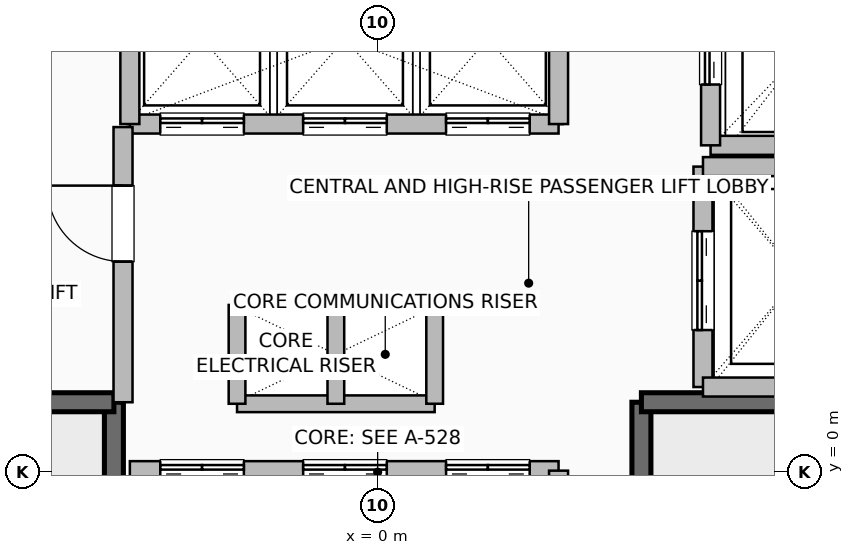
"""IFC4 building model, lengths in metres.
Left out: names, types, materials, properties, quantities, classifications, styles, units other than length and angle.
Written with IfcOpenShell. Run it as: python <this file> out.ifc"""

import sys

from ifc_helpers import new_model, si_unit, direction, frame, frame_2d, origin, place, context, subcontext, project, spatial, rectangle, extrude, element, fill, save


model = new_model("IFC4")
c1 = context("Model", 3, precision=1e-05, world=origin(), true_north=direction((0.0, 1.0)))
c2 = subcontext(c1, "Body", "Model", "MODEL_VIEW")
j1 = project(units=[si_unit("LENGTHUNIT", "METRE"), si_unit("PLANEANGLEUNIT", "RADIAN")], contexts=[c1])
p1 = place(None, origin())
s1 = spatial("IfcSite", under=j1, at=p1, CompositionType="ELEMENT")
p2 = place(p1, origin())
s2 = spatial("IfcBuilding", under=s1, at=p2, CompositionType="ELEMENT")
p3 = place(p2, frame((0.0, 0.0, 108.4)))
s3 = spatial("IfcBuildingStorey", under=s2, at=p3, CompositionType="ELEMENT", Elevation=108.4)
p4 = place(p3, frame((-3.47, -6.8, 0.0), z_axis=(0.0, 0.0, 1.0), x_axis=(0.0, 1.0, 0.0)))
e1 = element("IfcWall", 1, at=p4, inside=s3, PredefinedType="SHEAR", context=c2, shape_type="SweptSolid", body=[
    extrude(rectangle(XDim=7.72, YDim=0.25, at=frame_2d((3.86, 0.0))), origin(), (0.0, 0.0, 1.0), 3.36),
])
p5 = place(p3, frame((-6.8, 0.92, 0.0), z_axis=(0.0, 0.0, 1.0), x_axis=(1.0, 0.0, 0.0)))
e2 = element("IfcWall", 2, at=p5, inside=s3, PredefinedType="SHEAR", context=c2, shape_type="SweptSolid", body=[
    extrude(rectangle(XDim=3.33, YDim=0.25, at=frame_2d((1.665, 0.0))), origin(), (0.0, 0.0, 1.0), 3.36),
])
p6 = place(p3, frame((3.47, -6.8, 0.0), z_axis=(0.0, 0.0, 1.0), x_axis=(0.0, 1.0, 0.0)))
e3 = element("IfcWall", 3, at=p6, inside=s3, PredefinedType="SHEAR", context=c2, shape_type="SweptSolid", body=[
    extrude(rectangle(XDim=7.72, YDim=0.25, at=frame_2d((3.86, 0.0))), origin(), (0.0, 0.0, 1.0), 3.36),
])
p7 = place(p3, frame((3.47, 0.92, 0.0), z_axis=(0.0, 0.0, 1.0), x_axis=(1.0, 0.0, 0.0)))
e4 = element("IfcWall", 4, at=p7, inside=s3, PredefinedType="SHEAR", context=c2, shape_type="SweptSolid", body=[
    extrude(rectangle(XDim=3.33, YDim=0.25, at=frame_2d((1.665, 0.0))), origin(), (0.0, 0.0, 1.0), 3.36),
])
for number, where, z_axis, x_axis in (
    (5, (-1.85, 2.2, 0.0), (0.0, 0.0, 1.0), (1.0, 0.0, 0.0)),
    (6, (-1.85, 0.9, 0.0), (0.0, 0.0, 1.0), (1.0, 0.0, 0.0)),
):
    element("IfcWall", number, at=place(p3, frame(where, z_axis=z_axis, x_axis=x_axis)), inside=s3, PredefinedType="PARTITIONING", context=c2, shape_type="SweptSolid", body=[
        extrude(rectangle(XDim=2.6, YDim=0.22, at=frame_2d((1.3, 0.0))), origin(), (0.0, 0.0, 1.0), 3.36),
    ])
for number, where, z_axis, x_axis in (
    (7, (-0.55, 0.9, 0.0), (0.0, 0.0, 1.0), (0.0, 1.0, 0.0)),
    (8, (0.75, 0.9, 0.0), (0.0, 0.0, 1.0), (0.0, 1.0, 0.0)),
    (9, (-1.85, 0.9, 0.0), (0.0, 0.0, 1.0), (0.0, 1.0, 0.0)),
):
    element("IfcWall", number, at=place(p3, frame(where, z_axis=z_axis, x_axis=x_axis)), inside=s3, PredefinedType="PARTITIONING", context=c2, shape_type="SweptSolid", body=[
        extrude(rectangle(XDim=1.3, YDim=0.22, at=frame_2d((0.65, 0.0))), origin(), (0.0, 0.0, 1.0), 3.36),
    ])
p8 = place(p3, frame((-3.26, 0.02, 0.0), z_axis=(0.0, 0.0, 1.0), x_axis=(1.0, 0.0, 0.0)))
e10 = element("IfcWall", 10, at=p8, inside=s3, PredefinedType="SHEAR", context=c2, shape_type="SweptSolid", body=[
    extrude(rectangle(XDim=5.64, YDim=0.25, at=frame_2d((2.82, 0.0))), origin(), (0.0, 0.0, 1.0), 3.36),
])
p9 = place(p8, frame((0.4, 0.0, 0.0)))
e11 = element("IfcOpeningElement", 11, at=p9, cuts=e10, PredefinedType="OPENING", context=c2, shape_type="SweptSolid", body=[
    extrude(rectangle(XDim=1.1, YDim=2.2, at=frame_2d((0.55, 1.1))), frame((0.0, 0.135, 0.0), z_axis=(0.0, -1.0, 0.0), x_axis=(1.0, 0.0, 0.0)), (0.0, 0.0, 1.0), 0.27),
])
p10 = place(p8, frame((2.28, 0.0, 0.0)))
e12 = element("IfcOpeningElement", 12, at=p10, cuts=e10, PredefinedType="OPENING", context=c2, shape_type="SweptSolid", body=[
    extrude(rectangle(XDim=1.1, YDim=2.2, at=frame_2d((0.55, 1.1))), frame((0.0, 0.135, 0.0), z_axis=(0.0, -1.0, 0.0), x_axis=(1.0, 0.0, 0.0)), (0.0, 0.0, 1.0), 0.27),
])
p11 = place(p8, frame((4.16, 0.0, 0.0)))
e13 = element("IfcOpeningElement", 13, at=p11, cuts=e10, PredefinedType="OPENING", context=c2, shape_type="SweptSolid", body=[
    extrude(rectangle(XDim=1.1, YDim=2.2, at=frame_2d((0.55, 1.1))), frame((0.0, 0.135, 0.0), z_axis=(0.0, -1.0, 0.0), x_axis=(1.0, 0.0, 0.0)), (0.0, 0.0, 1.0), 0.27),
])
p12 = place(p3, frame((2.38, -2.42, 0.0), z_axis=(0.0, 0.0, 1.0), x_axis=(0.0, 1.0, 0.0)))
e14 = element("IfcWall", 14, at=p12, inside=s3, PredefinedType="SHEAR", context=c2, shape_type="SweptSolid", body=[
    extrude(rectangle(XDim=2.44, YDim=0.25, at=frame_2d((1.22, 0.0))), origin(), (0.0, 0.0, 1.0), 3.36),
])
p13 = place(p3, frame((-3.26, 4.58, 0.0), z_axis=(0.0, 0.0, 1.0), x_axis=(1.0, 0.0, 0.0)))
e15 = element("IfcWall", 15, at=p13, inside=s3, PredefinedType="SHEAR", context=c2, shape_type="SweptSolid", body=[
    extrude(rectangle(XDim=5.64, YDim=0.25, at=frame_2d((2.82, 0.0))), origin(), (0.0, 0.0, 1.0), 3.36),
])
p14 = place(p13, frame((0.4, 0.0, 0.0)))
e16 = element("IfcOpeningElement", 16, at=p14, cuts=e15, PredefinedType="OPENING", context=c2, shape_type="SweptSolid", body=[
    extrude(rectangle(XDim=1.1, YDim=2.2, at=frame_2d((0.55, 1.1))), frame((0.0, 0.135, 0.0), z_axis=(0.0, -1.0, 0.0), x_axis=(1.0, 0.0, 0.0)), (0.0, 0.0, 1.0), 0.27),
])
p15 = place(p13, frame((2.28, 0.0, 0.0)))
e17 = element("IfcOpeningElement", 17, at=p15, cuts=e15, PredefinedType="OPENING", context=c2, shape_type="SweptSolid", body=[
    extrude(rectangle(XDim=1.1, YDim=2.2, at=frame_2d((0.55, 1.1))), frame((0.0, 0.135, 0.0), z_axis=(0.0, -1.0, 0.0), x_axis=(1.0, 0.0, 0.0)), (0.0, 0.0, 1.0), 0.27),
])
p16 = place(p13, frame((4.16, 0.0, 0.0)))
e18 = element("IfcOpeningElement", 18, at=p16, cuts=e15, PredefinedType="OPENING", context=c2, shape_type="SweptSolid", body=[
    extrude(rectangle(XDim=1.1, YDim=2.2, at=frame_2d((0.55, 1.1))), frame((0.0, 0.135, 0.0), z_axis=(0.0, -1.0, 0.0), x_axis=(1.0, 0.0, 0.0)), (0.0, 0.0, 1.0), 0.27),
])
for number, where, z_axis, x_axis in (
    (19, (-3.26, 4.58, 0.0), (0.0, 0.0, 1.0), (0.0, 1.0, 0.0)),
    (20, (2.38, 4.58, 0.0), (0.0, 0.0, 1.0), (0.0, 1.0, 0.0)),
):
    element("IfcWall", number, at=place(p3, frame(where, z_axis=z_axis, x_axis=x_axis)), inside=s3, PredefinedType="SHEAR", context=c2, shape_type="SweptSolid", body=[
        extrude(rectangle(XDim=2.22, YDim=0.25, at=frame_2d((1.11, 0.0))), origin(), (0.0, 0.0, 1.0), 3.36),
    ])
p17 = place(p3, frame((4.38, 4.3, 0.0), z_axis=(0.0, 0.0, 1.0), x_axis=(1.0, 0.0, 0.0)))
e21 = element("IfcWall", 21, at=p17, inside=s3, PredefinedType="SHEAR", context=c2, shape_type="SweptSolid", body=[
    extrude(rectangle(XDim=2.42, YDim=0.25, at=frame_2d((1.21, 0.0))), origin(), (0.0, 0.0, 1.0), 3.36),
])
p18 = place(p3, frame((4.38, 4.3, 0.0), z_axis=(0.0, 0.0, 1.0), x_axis=(0.0, 1.0, 0.0)))
e22 = element("IfcWall", 22, at=p18, inside=s3, PredefinedType="SHEAR", context=c2, shape_type="SweptSolid", body=[
    extrude(rectangle(XDim=2.5, YDim=0.25, at=frame_2d((1.25, 0.0))), origin(), (0.0, 0.0, 1.0), 3.36),
])
p19 = place(p18, frame((0.8, 0.0, 0.0)))
e23 = element("IfcOpeningElement", 23, at=p19, cuts=e22, PredefinedType="OPENING", context=c2, shape_type="SweptSolid", body=[
    extrude(rectangle(XDim=1.2, YDim=2.2, at=frame_2d((0.6, 1.1))), frame((0.0, 0.135, 0.0), z_axis=(0.0, -1.0, 0.0), x_axis=(1.0, 0.0, 0.0)), (0.0, 0.0, 1.0), 0.27),
])
p20 = place(p3, frame((4.28, 1.12, 0.0), z_axis=(0.0, 0.0, 1.0), x_axis=(0.0, 1.0, 0.0)))
e24 = element("IfcWall", 24, at=p20, inside=s3, PredefinedType="SHEAR", context=c2, shape_type="SweptSolid", body=[
    extrude(rectangle(XDim=2.9, YDim=0.25, at=frame_2d((1.45, 0.0))), origin(), (0.0, 0.0, 1.0), 3.36),
])
p21 = place(p20, frame((0.75, 0.0, 0.0)))
e25 = element("IfcOpeningElement", 25, at=p21, cuts=e24, PredefinedType="OPENING", context=c2, shape_type="SweptSolid", body=[
    extrude(rectangle(XDim=1.3, YDim=2.3, at=frame_2d((0.65, 1.15))), frame((0.0, 0.135, 0.0), z_axis=(0.0, -1.0, 0.0), x_axis=(1.0, 0.0, 0.0)), (0.0, 0.0, 1.0), 0.27),
])
for number, where, z_axis, x_axis in (
    (26, (4.28, 1.12, 0.0), (0.0, 0.0, 1.0), (1.0, 0.0, 0.0)),
    (27, (4.28, 4.02, 0.0), (0.0, 0.0, 1.0), (1.0, 0.0, 0.0)),
):
    element("IfcWall", number, at=place(p3, frame(where, z_axis=z_axis, x_axis=x_axis)), inside=s3, PredefinedType="SHEAR", context=c2, shape_type="SweptSolid", body=[
        extrude(rectangle(XDim=2.52, YDim=0.25, at=frame_2d((1.26, 0.0))), origin(), (0.0, 0.0, 1.0), 3.36),
    ])
p22 = place(p3, frame((-3.35, 0.92, 0.0), z_axis=(0.0, 0.0, 1.0), x_axis=(0.0, 1.0, 0.0)))
e28 = element("IfcWall", 28, at=p22, inside=s3, PredefinedType="SHEAR", context=c2, shape_type="SweptSolid", body=[
    extrude(rectangle(XDim=3.62, YDim=0.25, at=frame_2d((1.81, 0.0))), origin(), (0.0, 0.0, 1.0), 3.36),
])
p23 = place(p22, frame((1.85, 0.0, 0.0)))
e29 = element("IfcOpeningElement", 29, at=p23, cuts=e28, PredefinedType="OPENING", context=c2, shape_type="SweptSolid", body=[
    extrude(rectangle(XDim=1.0, YDim=2.08, at=frame_2d((0.5, 1.04))), frame((0.0, 0.135, 0.0), z_axis=(0.0, -1.0, 0.0), x_axis=(1.0, 0.0, 0.0)), (0.0, 0.0, 1.0), 0.27),
])
p24 = place(p9, origin())
e30 = element("IfcDoor", 30, at=p24, inside=s3, OperationType="DOUBLE_DOOR_SLIDING", PredefinedType="DOOR", context=c2, shape_type="SweptSolid", body=[
    extrude(rectangle(XDim=1.1, YDim=2.2, at=frame_2d((0.55, 1.1))), frame((0.0, 0.025, 0.0), z_axis=(0.0, -1.0, 0.0), x_axis=(1.0, 0.0, 0.0)), (0.0, 0.0, 1.0), 0.05),
])
fill(e11, e30)
p25 = place(p10, origin())
e31 = element("IfcDoor", 31, at=p25, inside=s3, OperationType="DOUBLE_DOOR_SLIDING", PredefinedType="DOOR", context=c2, shape_type="SweptSolid", body=[
    extrude(rectangle(XDim=1.1, YDim=2.2, at=frame_2d((0.55, 1.1))), frame((0.0, 0.025, 0.0), z_axis=(0.0, -1.0, 0.0), x_axis=(1.0, 0.0, 0.0)), (0.0, 0.0, 1.0), 0.05),
])
fill(e12, e31)
p26 = place(p11, origin())
e32 = element("IfcDoor", 32, at=p26, inside=s3, OperationType="DOUBLE_DOOR_SLIDING", PredefinedType="DOOR", context=c2, shape_type="SweptSolid", body=[
    extrude(rectangle(XDim=1.1, YDim=2.2, at=frame_2d((0.55, 1.1))), frame((0.0, 0.025, 0.0), z_axis=(0.0, -1.0, 0.0), x_axis=(1.0, 0.0, 0.0)), (0.0, 0.0, 1.0), 0.05),
])
fill(e13, e32)
p27 = place(p14, origin())
e33 = element("IfcDoor", 33, at=p27, inside=s3, OperationType="DOUBLE_DOOR_SLIDING", PredefinedType="DOOR", context=c2, shape_type="SweptSolid", body=[
    extrude(rectangle(XDim=1.1, YDim=2.2, at=frame_2d((0.55, 1.1))), frame((0.0, 0.025, 0.0), z_axis=(0.0, -1.0, 0.0), x_axis=(1.0, 0.0, 0.0)), (0.0, 0.0, 1.0), 0.05),
])
fill(e16, e33)
p28 = place(p15, origin())
e34 = element("IfcDoor", 34, at=p28, inside=s3, OperationType="DOUBLE_DOOR_SLIDING", PredefinedType="DOOR", context=c2, shape_type="SweptSolid", body=[
    extrude(rectangle(XDim=1.1, YDim=2.2, at=frame_2d((0.55, 1.1))), frame((0.0, 0.025, 0.0), z_axis=(0.0, -1.0, 0.0), x_axis=(1.0, 0.0, 0.0)), (0.0, 0.0, 1.0), 0.05),
])
fill(e17, e34)
p29 = place(p16, origin())
e35 = element("IfcDoor", 35, at=p29, inside=s3, OperationType="DOUBLE_DOOR_SLIDING", PredefinedType="DOOR", context=c2, shape_type="SweptSolid", body=[
    extrude(rectangle(XDim=1.1, YDim=2.2, at=frame_2d((0.55, 1.1))), frame((0.0, 0.025, 0.0), z_axis=(0.0, -1.0, 0.0), x_axis=(1.0, 0.0, 0.0)), (0.0, 0.0, 1.0), 0.05),
])
fill(e18, e35)
p30 = place(p19, origin())
e36 = element("IfcDoor", 36, at=p30, inside=s3, OperationType="DOUBLE_DOOR_SLIDING", PredefinedType="DOOR", context=c2, shape_type="SweptSolid", body=[
    extrude(rectangle(XDim=1.2, YDim=2.2, at=frame_2d((0.6, 1.1))), frame((0.0, 0.025, 0.0), z_axis=(0.0, -1.0, 0.0), x_axis=(1.0, 0.0, 0.0)), (0.0, 0.0, 1.0), 0.05),
])
fill(e23, e36)
p31 = place(p21, origin())
e37 = element("IfcDoor", 37, at=p31, inside=s3, OperationType="DOUBLE_DOOR_SLIDING", PredefinedType="DOOR", context=c2, shape_type="SweptSolid", body=[
    extrude(rectangle(XDim=1.3, YDim=2.3, at=frame_2d((0.65, 1.15))), frame((0.0, 0.025, 0.0), z_axis=(0.0, -1.0, 0.0), x_axis=(1.0, 0.0, 0.0)), (0.0, 0.0, 1.0), 0.05),
])
fill(e25, e37)
p32 = place(p23, origin())
e38 = element("IfcDoor", 38, at=p32, inside=s3, OperationType="SINGLE_SWING_RIGHT", PredefinedType="DOOR", context=c2, shape_type="SweptSolid", body=[
    extrude(rectangle(XDim=1.0, YDim=2.08, at=frame_2d((0.5, 1.04))), frame((0.0, 0.025, 0.0), z_axis=(0.0, -1.0, 0.0), x_axis=(1.0, 0.0, 0.0)), (0.0, 0.0, 1.0), 0.05),
])
fill(e29, e38)
save(model, sys.argv[1])
